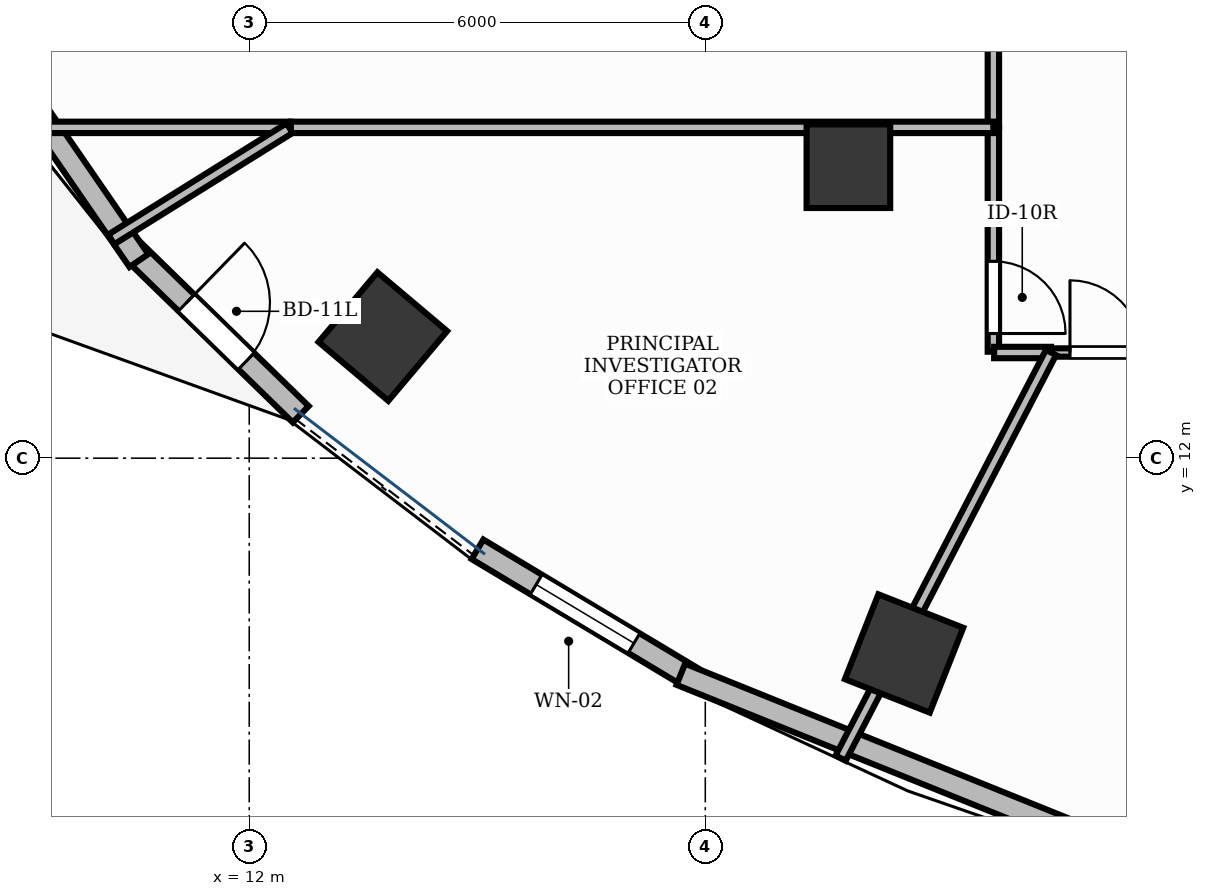
"""IFC4 building model, lengths in metres.
Left out: names, types, materials, properties, quantities, classifications, styles, units other than length and angle.
Written with IfcOpenShell. Run it as: python <this file> out.ifc"""

import sys

from ifc_helpers import new_model, si_unit, direction, frame, frame_2d, origin, origin_2d, place, context, subcontext, project, spatial, rectangle, extrude, element, fill, save


model = new_model("IFC4")
c1 = context("Model", 3, precision=1e-05, world=origin(), true_north=direction((0.0, 1.0)))
c2 = subcontext(c1, "Body", "Model", "MODEL_VIEW")
j1 = project(units=[si_unit("LENGTHUNIT", "METRE"), si_unit("PLANEANGLEUNIT", "RADIAN")], contexts=[c1])
p1 = place(None, origin())
s1 = spatial("IfcSite", under=j1, at=p1, CompositionType="ELEMENT")
p2 = place(p1, origin())
s2 = spatial("IfcBuilding", under=s1, at=p2, CompositionType="ELEMENT")
p3 = place(p2, frame((0.0, 0.0, 132.0)))
s3 = spatial("IfcBuildingStorey", under=s2, at=p3, CompositionType="ELEMENT", Elevation=132.0)
p4 = place(p3, frame((13.758, 13.6, -0.0), z_axis=(0.0, 0.0, 1.0), x_axis=(-0.764246456939, 0.644924300253, 0.0)))
e1 = element("IfcColumn", 1, at=p4, inside=s3, PredefinedType="COLUMN", context=c2, shape_type="SweptSolid", body=[
    extrude(rectangle(XDim=1.2, YDim=1.2, at=origin_2d()), origin(), (0.0, 0.0, 1.0), 3.901),
])
p5 = place(p3, frame((19.883, 15.841, -0.0), z_axis=(0.0, 0.0, 1.0), x_axis=(1.0, 0.0, 0.0)))
e2 = element("IfcColumn", 2, at=p5, inside=s3, PredefinedType="COLUMN", context=c2, shape_type="SweptSolid", body=[
    extrude(rectangle(XDim=1.1, YDim=1.1, at=origin_2d()), origin(), (0.0, 0.0, 1.0), 3.901),
])
p6 = place(p3, frame((20.615, 9.431, -0.0), z_axis=(0.0, 0.0, 1.0), x_axis=(-0.930225540858, 0.366988341962, 0.0)))
e3 = element("IfcColumn", 3, at=p6, inside=s3, PredefinedType="COLUMN", context=c2, shape_type="SweptSolid", body=[
    extrude(rectangle(XDim=1.2, YDim=1.2, at=origin_2d()), origin(), (0.0, 0.0, 1.0), 3.901),
])
p7 = place(p3, frame((10.456, 14.743, 0.0), z_axis=(0.0, 0.0, 1.0), x_axis=(0.716099460419, -0.697998254144, 0.0)))
e4 = element("IfcWall", 4, at=p7, inside=s3, PredefinedType="STANDARD", context=c2, shape_type="SweptSolid", body=[
    extrude(rectangle(XDim=3.102, YDim=0.3, at=frame_2d((1.551, 0.0))), origin(), (0.0, 0.0, 1.0), 3.9),
])
p8 = place(p7, frame((1.001, 0.0, 0.0)))
e5 = element("IfcOpeningElement", 5, at=p8, cuts=e4, PredefinedType="OPENING", context=c2, shape_type="SweptSolid", body=[
    extrude(rectangle(XDim=1.1, YDim=2.15, at=frame_2d((0.55, 1.075))), frame((0.0, 0.165, 0.0), z_axis=(0.0, -1.0, 0.0), x_axis=(1.0, 0.0, 0.0)), (0.0, 0.0, 1.0), 0.33),
])
p9 = place(p3, frame((15.003, 10.801, 0.0), z_axis=(0.0, 0.0, 1.0), x_axis=(0.85758429223, -0.514343447242, 0.0)))
e6 = element("IfcWall", 6, at=p9, inside=s3, PredefinedType="STANDARD", context=c2, shape_type="SweptSolid", body=[
    extrude(rectangle(XDim=3.3, YDim=0.3, at=frame_2d((1.65, 0.0))), origin(), (0.0, 0.0, 1.0), 3.9),
])
p10 = place(p9, frame((0.9, 0.0, 0.95)))
e7 = element("IfcOpeningElement", 7, at=p10, cuts=e6, PredefinedType="OPENING", context=c2, shape_type="SweptSolid", body=[
    extrude(rectangle(XDim=1.5, YDim=1.8, at=frame_2d((0.75, 0.9))), frame((0.0, 0.165, 0.0), z_axis=(0.0, -1.0, 0.0), x_axis=(1.0, 0.0, 0.0)), (0.0, 0.0, 1.0), 0.33),
])
p11 = place(p3, frame((7.246, 19.399, 0.0), z_axis=(0.0, 0.0, 1.0), x_axis=(0.566825798999, -0.823837674296, 0.0)))
e8 = element("IfcWall", 8, at=p11, inside=s3, PredefinedType="STANDARD", context=c2, shape_type="SweptSolid", body=[
    extrude(rectangle(XDim=5.826, YDim=0.3, at=frame_2d((2.913, 0.0))), origin(), (0.0, 0.0, 1.0), 3.9),
])
p12 = place(p3, frame((17.678, 9.157, 0.0), z_axis=(0.0, 0.0, 1.0), x_axis=(0.927423312416, -0.374013368194, 0.0)))
e9 = element("IfcWall", 9, at=p12, inside=s3, PredefinedType="STANDARD", context=c2, shape_type="SweptSolid", body=[
    extrude(rectangle(XDim=6.769, YDim=0.3, at=frame_2d((3.385, 0.0))), origin(), (0.0, 0.0, 1.0), 3.47),
])
p13 = place(p3, frame((21.79, 21.44, 0.0), z_axis=(0.0, 0.0, 1.0), x_axis=(0.0, -1.0, 0.0)))
e10 = element("IfcWall", 10, at=p13, inside=s3, PredefinedType="PARTITIONING", context=c2, shape_type="SweptSolid", body=[
    extrude(rectangle(XDim=5.088, YDim=0.15, at=frame_2d((2.544, 0.0))), origin(), (0.0, 0.0, 1.0), 2.91),
])
p14 = place(p13, frame((0.24, 0.0, 0.0)))
e11 = element("IfcOpeningElement", 11, at=p14, cuts=e10, PredefinedType="OPENING", context=c2, shape_type="SweptSolid", body=[
    extrude(rectangle(XDim=0.95, YDim=2.15, at=frame_2d((0.475, 1.075))), frame((0.0, 0.09, 0.0), z_axis=(0.0, -1.0, 0.0), x_axis=(1.0, 0.0, 0.0)), (0.0, 0.0, 1.0), 0.18),
])
p15 = place(p3, frame((21.79, 16.342, 0.0), z_axis=(0.0, 0.0, 1.0), x_axis=(0.0, -1.0, 0.0)))
e12 = element("IfcWall", 12, at=p15, inside=s3, PredefinedType="PARTITIONING", context=c2, shape_type="SweptSolid", body=[
    extrude(rectangle(XDim=2.942, YDim=0.15, at=frame_2d((1.471, 0.0))), origin(), (0.0, 0.0, 1.0), 2.91),
])
p16 = place(p15, frame((1.752, 0.0, 0.0)))
e13 = element("IfcOpeningElement", 13, at=p16, cuts=e12, PredefinedType="OPENING", context=c2, shape_type="SweptSolid", body=[
    extrude(rectangle(XDim=0.95, YDim=2.15, at=frame_2d((0.475, 1.075))), frame((0.0, 0.09, 0.0), z_axis=(0.0, -1.0, 0.0), x_axis=(1.0, 0.0, 0.0)), (0.0, 0.0, 1.0), 0.18),
])
p17 = place(p3, frame((22.558, 13.39, 0.0), z_axis=(0.0, 0.0, 1.0), x_axis=(1.0, 0.0, 0.0)))
e14 = element("IfcWall", 14, at=p17, inside=s3, PredefinedType="MOVABLE", context=c2, shape_type="SweptSolid", body=[
    extrude(rectangle(XDim=5.942, YDim=0.11, at=frame_2d((2.971, 0.0))), origin(), (0.0, 0.0, 1.0), 2.91),
])
p18 = place(p17, frame((0.24, 0.0, 0.0)))
e15 = element("IfcOpeningElement", 15, at=p18, cuts=e14, PredefinedType="OPENING", context=c2, shape_type="SweptSolid", body=[
    extrude(rectangle(XDim=0.95, YDim=2.15, at=frame_2d((0.475, 1.075))), frame((0.0, 0.07, 0.0), z_axis=(0.0, -1.0, 0.0), x_axis=(1.0, 0.0, 0.0)), (0.0, 0.0, 1.0), 0.14),
])
p19 = place(p3, frame((21.79, 16.352, 0.0), z_axis=(0.0, 0.0, 1.0), x_axis=(-1.0, 0.0, 0.0)))
e16 = element("IfcWall", 16, at=p19, inside=s3, PredefinedType="PARTITIONING", context=c2, shape_type="SweptSolid", body=[
    extrude(rectangle(XDim=9.243, YDim=0.15, at=frame_2d((4.622, 0.0))), origin(), (0.0, 0.0, 1.0), 2.91),
])
p20 = place(p3, frame((12.539, 16.352, 0.0), z_axis=(0.0, 0.0, 1.0), x_axis=(-1.0, 0.0, 0.0)))
e17 = element("IfcWall", 17, at=p20, inside=s3, PredefinedType="PARTITIONING", context=c2, shape_type="SweptSolid", body=[
    extrude(rectangle(XDim=3.451, YDim=0.15, at=frame_2d((1.725, 0.0))), origin(), (0.0, 0.0, 1.0), 2.91),
])
p21 = place(p3, frame((10.184, 14.878, 0.0), z_axis=(0.0, 0.0, 1.0), x_axis=(0.848374938895, 0.529395847221, 0.0)))
e18 = element("IfcWall", 18, at=p21, inside=s3, PredefinedType="PARTITIONING", context=c2, shape_type="SweptSolid", body=[
    extrude(rectangle(XDim=2.766, YDim=0.15, at=frame_2d((1.383, 0.0))), origin(), (0.0, 0.0, 1.0), 2.91),
])
p22 = place(p3, frame((21.8, 13.39, 0.0), z_axis=(0.0, 0.0, 1.0), x_axis=(1.0, 0.0, 0.0)))
e19 = element("IfcWall", 19, at=p22, inside=s3, PredefinedType="PARTITIONING", context=c2, shape_type="SweptSolid", body=[
    extrude(rectangle(XDim=0.748, YDim=0.15, at=frame_2d((0.374, 0.0))), origin(), (0.0, 0.0, 1.0), 2.91),
])
p23 = place(p3, frame((22.548, 13.39, 0.0), z_axis=(0.0, 0.0, 1.0), x_axis=(-0.460357473993, -0.887733629046, 0.0)))
e20 = element("IfcWall", 20, at=p23, inside=s3, PredefinedType="PARTITIONING", context=c2, shape_type="SweptSolid", body=[
    extrude(rectangle(XDim=6.011, YDim=0.15, at=frame_2d((3.005, 0.0))), origin(), (0.0, 0.0, 1.0), 2.91),
])
p24 = place(p8, origin())
e21 = element("IfcDoor", 21, at=p24, inside=s3, OperationType="SINGLE_SWING_LEFT", PredefinedType="DOOR", context=c2, shape_type="SweptSolid", body=[
    extrude(rectangle(XDim=1.1, YDim=2.15, at=frame_2d((0.55, 1.075))), frame((0.0, 0.025, 0.0), z_axis=(0.0, -1.0, 0.0), x_axis=(1.0, 0.0, 0.0)), (0.0, 0.0, 1.0), 0.05),
])
fill(e5, e21)
p25 = place(p10, origin())
e22 = element("IfcWindow", 22, at=p25, inside=s3, PartitioningType="DOUBLE_PANEL_VERTICAL", PredefinedType="WINDOW", context=c2, shape_type="SweptSolid", body=[
    extrude(rectangle(XDim=1.5, YDim=1.8, at=frame_2d((0.75, 0.9))), frame((0.0, 0.03, 0.0), z_axis=(0.0, -1.0, 0.0), x_axis=(1.0, 0.0, 0.0)), (0.0, 0.0, 1.0), 0.06),
])
fill(e7, e22)
p26 = place(p16, origin())
e23 = element("IfcDoor", 23, at=p26, inside=s3, OperationType="SINGLE_SWING_RIGHT", PredefinedType="DOOR", context=c2, shape_type="SweptSolid", body=[
    extrude(rectangle(XDim=0.95, YDim=2.15, at=frame_2d((0.475, 1.075))), frame((0.0, 0.025, 0.0), z_axis=(0.0, -1.0, 0.0), x_axis=(1.0, 0.0, 0.0)), (0.0, 0.0, 1.0), 0.05),
])
fill(e13, e23)
p27 = place(p18, origin())
e24 = element("IfcDoor", 24, at=p27, inside=s3, OperationType="SINGLE_SWING_LEFT", PredefinedType="DOOR", context=c2, shape_type="SweptSolid", body=[
    extrude(rectangle(XDim=0.95, YDim=2.15, at=frame_2d((0.475, 1.075))), frame((0.0, 0.025, 0.0), z_axis=(0.0, -1.0, 0.0), x_axis=(1.0, 0.0, 0.0)), (0.0, 0.0, 1.0), 0.05),
])
fill(e15, e24)
save(model, sys.argv[1])
